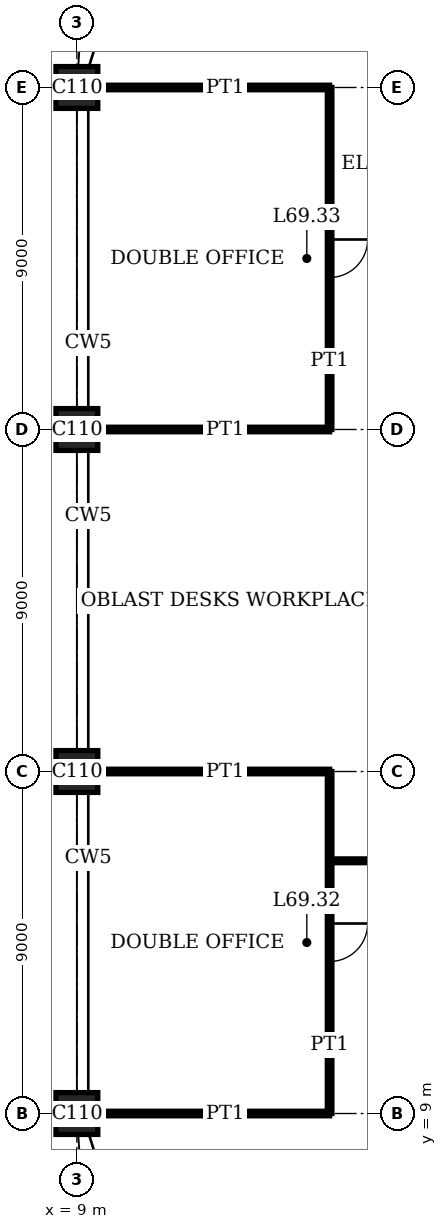
"""IFC4 building model, lengths in metres.
Left out: names, types, materials, properties, quantities, classifications, styles, units other than length and angle.
Written with IfcOpenShell. Run it as: python <this file> out.ifc"""

import sys

from ifc_helpers import new_model, si_unit, direction, frame, frame_2d, origin, origin_2d, place, context, subcontext, project, spatial, rectangle, extrude, element, fill, save


model = new_model("IFC4")
c1 = context("Model", 3, precision=1e-05, world=origin(), true_north=direction((0.0, 1.0)))
c2 = subcontext(c1, "Body", "Model", "MODEL_VIEW")
j1 = project(units=[si_unit("LENGTHUNIT", "METRE"), si_unit("PLANEANGLEUNIT", "RADIAN")], contexts=[c1])
p1 = place(None, origin())
s1 = spatial("IfcSite", under=j1, at=p1, CompositionType="ELEMENT")
p2 = place(p1, origin())
s2 = spatial("IfcBuilding", under=s1, at=p2, CompositionType="ELEMENT")
p3 = place(p2, frame((0.0, 0.0, 283.4)))
s3 = spatial("IfcBuildingStorey", under=s2, at=p3, CompositionType="ELEMENT", Elevation=283.4)
for number, where, z_axis, x_axis in (
    (1, (9.0, 9.0, 0.0), (0.0, 0.0, 1.0), (1.0, 0.0, 0.0)),
    (2, (9.0, 18.0, 0.0), (0.0, 0.0, 1.0), (1.0, 0.0, 0.0)),
    (3, (9.0, 27.0, 0.0), (0.0, 0.0, 1.0), (1.0, 0.0, 0.0)),
    (4, (9.0, 36.0, 0.0), (0.0, 0.0, 1.0), (1.0, 0.0, 0.0)),
):
    element("IfcColumn", number, at=place(p3, frame(where, z_axis=z_axis, x_axis=x_axis)), inside=s3, PredefinedType="COLUMN", context=c2, shape_type="SweptSolid", body=[
        extrude(rectangle(XDim=1.1, YDim=1.1, at=origin_2d()), origin(), (0.0, 0.0, 1.0), 4.0),
    ])
p4 = place(p3, frame((9.55, 9.0, 0.0), z_axis=(0.0, 0.0, 1.0), x_axis=(1.0, 0.0, 0.0)))
e5 = element("IfcWall", 5, at=p4, inside=s3, PredefinedType="PARTITIONING", context=c2, shape_type="SweptSolid", body=[
    extrude(rectangle(XDim=6.1, YDim=0.12, at=frame_2d((3.05, 0.0))), origin(), (0.0, 0.0, 1.0), 3.05),
])
p5 = place(p3, frame((15.66, 15.65, 0.0), z_axis=(0.0, 0.0, 1.0), x_axis=(1.0, 0.0, 0.0)))
e6 = element("IfcWall", 6, at=p5, inside=s3, PredefinedType="PARTITIONING", context=c2, shape_type="SweptSolid", body=[
    extrude(rectangle(XDim=11.33, YDim=0.1, at=frame_2d((5.665, 0.0))), origin(), (0.0, 0.0, 1.0), 3.75),
])
p6 = place(p5, frame((5.165, 0.0, 0.0)))
e7 = element("IfcOpeningElement", 7, at=p6, cuts=e6, PredefinedType="OPENING", context=c2, shape_type="SweptSolid", body=[
    extrude(rectangle(XDim=1.0, YDim=2.4, at=frame_2d((0.5, 1.2))), frame((0.0, 0.06, 0.0), z_axis=(0.0, -1.0, 0.0), x_axis=(1.0, 0.0, 0.0)), (0.0, 0.0, 1.0), 0.12),
])
for number, where, z_axis, x_axis in (
    (8, (9.55, 18.0, 0.0), (0.0, 0.0, 1.0), (1.0, 0.0, 0.0)),
    (9, (9.55, 27.0, 0.0), (0.0, 0.0, 1.0), (1.0, 0.0, 0.0)),
    (10, (9.55, 36.0, 0.0), (0.0, 0.0, 1.0), (1.0, 0.0, 0.0)),
):
    element("IfcWall", number, at=place(p3, frame(where, z_axis=z_axis, x_axis=x_axis)), inside=s3, PredefinedType="PARTITIONING", context=c2, shape_type="SweptSolid", body=[
        extrude(rectangle(XDim=6.1, YDim=0.12, at=frame_2d((3.05, 0.0))), origin(), (0.0, 0.0, 1.0), 3.05),
    ])
p7 = place(p3, frame((15.65, 9.0, 0.0), z_axis=(0.0, 0.0, 1.0), x_axis=(0.0, 1.0, 0.0)))
e11 = element("IfcWall", 11, at=p7, inside=s3, PredefinedType="PARTITIONING", context=c2, shape_type="SweptSolid", body=[
    extrude(rectangle(XDim=9.0, YDim=0.12, at=frame_2d((4.5, 0.0))), origin(), (0.0, 0.0, 1.0), 3.75),
])
p8 = place(p7, frame((4.0, 0.0, 0.0)))
e12 = element("IfcOpeningElement", 12, at=p8, cuts=e11, PredefinedType="OPENING", context=c2, shape_type="SweptSolid", body=[
    extrude(rectangle(XDim=1.0, YDim=2.4, at=frame_2d((0.5, 1.2))), frame((0.0, 0.07, 0.0), z_axis=(0.0, -1.0, 0.0), x_axis=(1.0, 0.0, 0.0)), (0.0, 0.0, 1.0), 0.14),
])
p9 = place(p3, frame((15.65, 27.0, 0.0), z_axis=(0.0, 0.0, 1.0), x_axis=(0.0, 1.0, 0.0)))
e13 = element("IfcWall", 13, at=p9, inside=s3, PredefinedType="PARTITIONING", context=c2, shape_type="SweptSolid", body=[
    extrude(rectangle(XDim=9.0, YDim=0.12, at=frame_2d((4.5, 0.0))), origin(), (0.0, 0.0, 1.0), 3.75),
])
p10 = place(p9, frame((4.0, 0.0, 0.0)))
e14 = element("IfcOpeningElement", 14, at=p10, cuts=e13, PredefinedType="OPENING", context=c2, shape_type="SweptSolid", body=[
    extrude(rectangle(XDim=1.0, YDim=2.4, at=frame_2d((0.5, 1.2))), frame((0.0, 0.07, 0.0), z_axis=(0.0, -1.0, 0.0), x_axis=(1.0, 0.0, 0.0)), (0.0, 0.0, 1.0), 0.14),
])
p11 = place(p8, origin())
e15 = element("IfcDoor", 15, at=p11, inside=s3, OperationType="SINGLE_SWING_RIGHT", PredefinedType="DOOR", context=c2, shape_type="SweptSolid", body=[
    extrude(rectangle(XDim=1.0, YDim=2.4, at=frame_2d((0.5, 1.2))), frame((0.0, 0.025, 0.0), z_axis=(0.0, -1.0, 0.0), x_axis=(1.0, 0.0, 0.0)), (0.0, 0.0, 1.0), 0.05),
])
fill(e12, e15)
p12 = place(p10, origin())
e16 = element("IfcDoor", 16, at=p12, inside=s3, OperationType="SINGLE_SWING_RIGHT", PredefinedType="DOOR", context=c2, shape_type="SweptSolid", body=[
    extrude(rectangle(XDim=1.0, YDim=2.4, at=frame_2d((0.5, 1.2))), frame((0.0, 0.025, 0.0), z_axis=(0.0, -1.0, 0.0), x_axis=(1.0, 0.0, 0.0)), (0.0, 0.0, 1.0), 0.05),
])
fill(e14, e16)
save(model, sys.argv[1])
